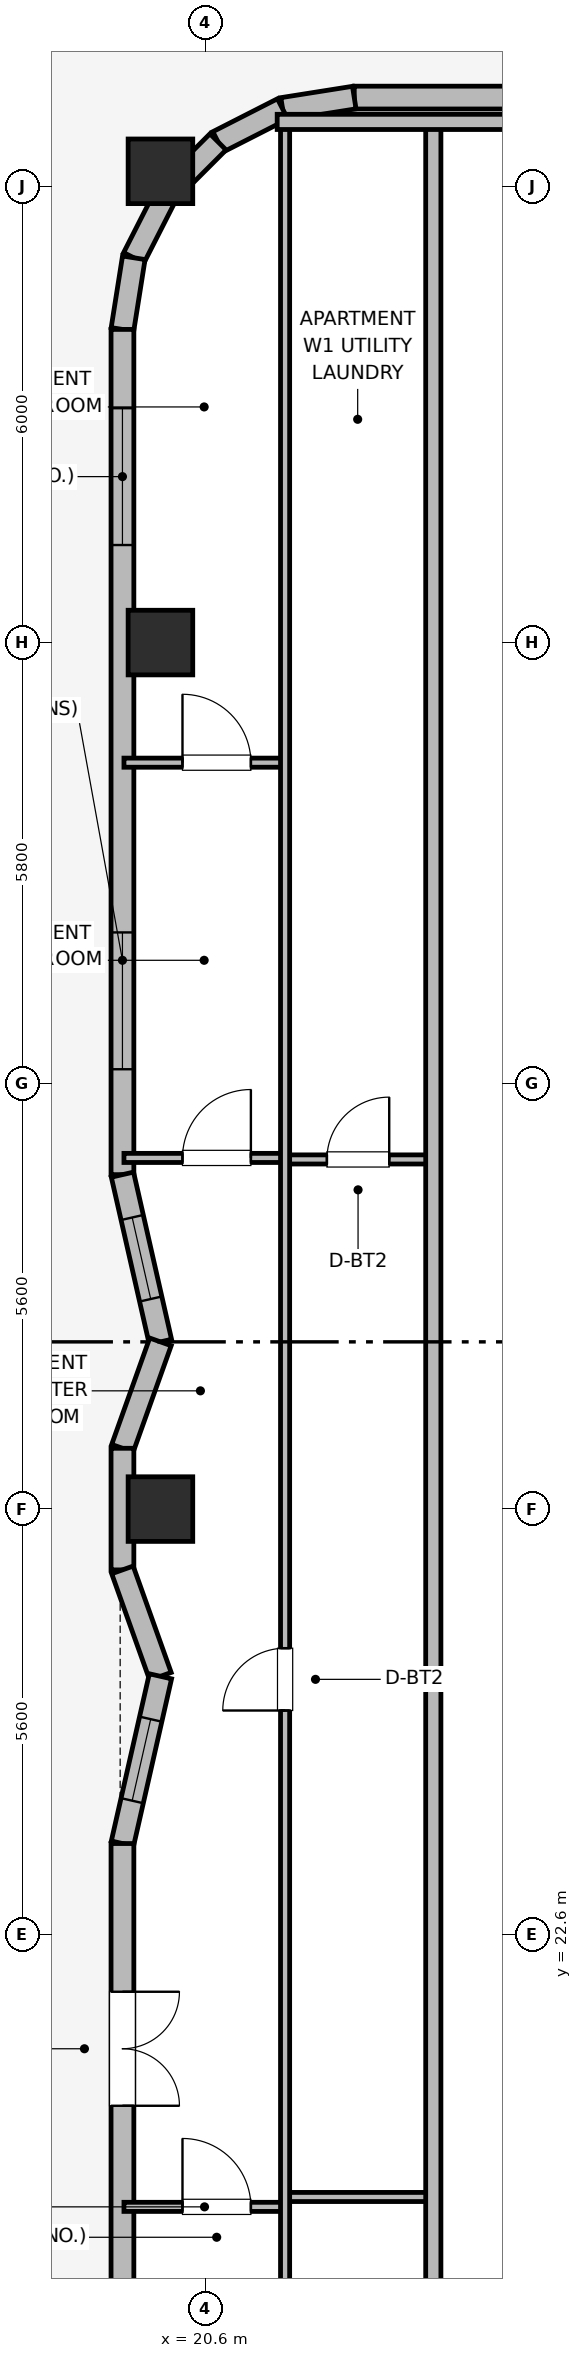
"""IFC4 building model, lengths in metres.
Left out: names, types, materials, properties, quantities, classifications, styles, units other than length and angle.
Written with IfcOpenShell. Run it as: python <this file> out.ifc"""

import sys

from ifc_helpers import new_model, si_unit, direction, frame, frame_2d, origin, origin_2d, place, context, subcontext, project, spatial, rectangle, extrude, element, fill, save


model = new_model("IFC4")
c1 = context("Model", 3, precision=1e-05, world=origin(), true_north=direction((0.0, 1.0)))
c2 = subcontext(c1, "Body", "Model", "MODEL_VIEW")
j1 = project(units=[si_unit("LENGTHUNIT", "METRE"), si_unit("PLANEANGLEUNIT", "RADIAN")], contexts=[c1])
p1 = place(None, origin())
s1 = spatial("IfcSite", under=j1, at=p1, CompositionType="ELEMENT")
p2 = place(p1, origin())
s2 = spatial("IfcBuilding", under=s1, at=p2, CompositionType="ELEMENT")
p3 = place(p2, frame((0.0, 0.0, 225.8)))
s3 = spatial("IfcBuildingStorey", under=s2, at=p3, CompositionType="ELEMENT", Elevation=225.8)
for number, where, z_axis, x_axis in (
    (1, (20.01, 28.2, 0.0), (0.0, 0.0, 1.0), (1.0, 0.0, 0.0)),
    (2, (20.01, 39.6, 0.0), (0.0, 0.0, 1.0), (1.0, 0.0, 0.0)),
    (3, (20.01, 45.8, 0.0), (0.0, 0.0, 1.0), (1.0, 0.0, 0.0)),
):
    element("IfcColumn", number, at=place(p3, frame(where, z_axis=z_axis, x_axis=x_axis)), inside=s3, PredefinedType="COLUMN", context=c2, shape_type="SweptSolid", body=[
        extrude(rectangle(XDim=0.85, YDim=0.85, at=origin_2d()), origin(), (0.0, 0.0, 1.0), 3.7),
    ])
p4 = place(p3, frame((55.84, 46.77, 0.0), z_axis=(0.0, 0.0, 1.0), x_axis=(-1.0, 0.0, 0.0)))
e4 = element("IfcWall", 4, at=p4, inside=s3, PredefinedType="SOLIDWALL", context=c2, shape_type="SweptSolid", body=[
    extrude(rectangle(XDim=33.28, YDim=0.3, at=frame_2d((16.64, 0.0))), origin(), (0.0, 0.0, 1.0), 2.73),
])
p5 = place(p4, frame((4.93, 0.0, 0.71)))
e5 = element("IfcOpeningElement", 5, at=p5, cuts=e4, PredefinedType="OPENING", context=c2, shape_type="SweptSolid", body=[
    extrude(rectangle(XDim=2.1, YDim=1.9, at=frame_2d((1.05, 0.95))), frame((0.0, 0.16, 0.0), z_axis=(0.0, -1.0, 0.0), x_axis=(1.0, 0.0, 0.0)), (0.0, 0.0, 1.0), 0.32),
])
p6 = place(p4, frame((8.483, 0.0, 0.71)))
e6 = element("IfcOpeningElement", 6, at=p6, cuts=e4, PredefinedType="OPENING", context=c2, shape_type="SweptSolid", body=[
    extrude(rectangle(XDim=2.1, YDim=1.9, at=frame_2d((1.05, 0.95))), frame((0.0, 0.16, 0.0), z_axis=(0.0, -1.0, 0.0), x_axis=(1.0, 0.0, 0.0)), (0.0, 0.0, 1.0), 0.32),
])
p7 = place(p4, frame((15.59, 0.0, 0.71)))
e7 = element("IfcOpeningElement", 7, at=p7, cuts=e4, PredefinedType="OPENING", context=c2, shape_type="SweptSolid", body=[
    extrude(rectangle(XDim=2.1, YDim=1.9, at=frame_2d((1.05, 0.95))), frame((0.0, 0.16, 0.0), z_axis=(0.0, -1.0, 0.0), x_axis=(1.0, 0.0, 0.0)), (0.0, 0.0, 1.0), 0.32),
])
p8 = place(p4, frame((22.697, 0.0, 0.71)))
e8 = element("IfcOpeningElement", 8, at=p8, cuts=e4, PredefinedType="OPENING", context=c2, shape_type="SweptSolid", body=[
    extrude(rectangle(XDim=2.1, YDim=1.9, at=frame_2d((1.05, 0.95))), frame((0.0, 0.16, 0.0), z_axis=(0.0, -1.0, 0.0), x_axis=(1.0, 0.0, 0.0)), (0.0, 0.0, 1.0), 0.32),
])
p9 = place(p4, frame((26.25, 0.0, 0.71)))
e9 = element("IfcOpeningElement", 9, at=p9, cuts=e4, PredefinedType="OPENING", context=c2, shape_type="SweptSolid", body=[
    extrude(rectangle(XDim=2.1, YDim=1.9, at=frame_2d((1.05, 0.95))), frame((0.0, 0.16, 0.0), z_axis=(0.0, -1.0, 0.0), x_axis=(1.0, 0.0, 0.0)), (0.0, 0.0, 1.0), 0.32),
])
p10 = place(p3, frame((22.56, 46.77, 0.0), z_axis=(0.0, 0.0, 1.0), x_axis=(-0.987669453596, -0.156553666304, 0.0)))
e10 = element("IfcWall", 10, at=p10, inside=s3, PredefinedType="SOLIDWALL", context=c2, shape_type="SweptSolid", body=[
    extrude(rectangle(XDim=0.954, YDim=0.3, at=frame_2d((0.477, 0.0))), origin(), (0.0, 0.0, 1.0), 2.73),
])
p11 = place(p3, frame((21.617, 46.621, 0.0), z_axis=(0.0, 0.0, 1.0), x_axis=(-0.891023873617, -0.45395644796, 0.0)))
e11 = element("IfcWall", 11, at=p11, inside=s3, PredefinedType="SOLIDWALL", context=c2, shape_type="SweptSolid", body=[
    extrude(rectangle(XDim=0.954, YDim=0.3, at=frame_2d((0.477, 0.0))), origin(), (0.0, 0.0, 1.0), 2.73),
])
p12 = place(p3, frame((20.767, 46.188, 0.0), z_axis=(0.0, 0.0, 1.0), x_axis=(-0.707106781187, -0.707106781187, 0.0)))
e12 = element("IfcWall", 12, at=p12, inside=s3, PredefinedType="SOLIDWALL", context=c2, shape_type="SweptSolid", body=[
    extrude(rectangle(XDim=0.954, YDim=0.3, at=frame_2d((0.477, 0.0))), origin(), (0.0, 0.0, 1.0), 2.73),
])
p13 = place(p3, frame((20.093, 45.513, 0.0), z_axis=(0.0, 0.0, 1.0), x_axis=(-0.454159573051, -0.890920356825, 0.0)))
e13 = element("IfcWall", 13, at=p13, inside=s3, PredefinedType="SOLIDWALL", context=c2, shape_type="SweptSolid", body=[
    extrude(rectangle(XDim=0.954, YDim=0.3, at=frame_2d((0.477, 0.0))), origin(), (0.0, 0.0, 1.0), 2.73),
])
p14 = place(p3, frame((19.659, 44.663, 0.0), z_axis=(0.0, 0.0, 1.0), x_axis=(-0.156304114255, -0.987708977314, 0.0)))
e14 = element("IfcWall", 14, at=p14, inside=s3, PredefinedType="SOLIDWALL", context=c2, shape_type="SweptSolid", body=[
    extrude(rectangle(XDim=0.954, YDim=0.3, at=frame_2d((0.477, 0.0))), origin(), (0.0, 0.0, 1.0), 2.73),
])
p15 = place(p3, frame((19.51, 43.72, 0.0), z_axis=(0.0, 0.0, 1.0), x_axis=(0.0, -1.0, 0.0)))
e15 = element("IfcWall", 15, at=p15, inside=s3, PredefinedType="SOLIDWALL", context=c2, shape_type="SweptSolid", body=[
    extrude(rectangle(XDim=11.12, YDim=0.3, at=frame_2d((5.56, 0.0))), origin(), (0.0, 0.0, 1.0), 2.73),
])
p16 = place(p15, frame((1.037, 0.0, 0.76)))
e16 = element("IfcOpeningElement", 16, at=p16, cuts=e15, PredefinedType="OPENING", context=c2, shape_type="SweptSolid", body=[
    extrude(rectangle(XDim=1.8, YDim=1.85, at=frame_2d((0.9, 0.925))), frame((0.0, 0.16, 0.0), z_axis=(0.0, -1.0, 0.0), x_axis=(1.0, 0.0, 0.0)), (0.0, 0.0, 1.0), 0.32),
])
p17 = place(p15, frame((7.933, 0.0, 0.76)))
e17 = element("IfcOpeningElement", 17, at=p17, cuts=e15, PredefinedType="OPENING", context=c2, shape_type="SweptSolid", body=[
    extrude(rectangle(XDim=1.8, YDim=1.85, at=frame_2d((0.9, 0.925))), frame((0.0, 0.16, 0.0), z_axis=(0.0, -1.0, 0.0), x_axis=(1.0, 0.0, 0.0)), (0.0, 0.0, 1.0), 0.32),
])
p18 = place(p3, frame((19.51, 32.6, 0.0), z_axis=(0.0, 0.0, 1.0), x_axis=(0.221602396322, -0.975137107254, 0.0)))
e18 = element("IfcWall", 18, at=p18, inside=s3, PredefinedType="SOLIDWALL", context=c2, shape_type="SweptSolid", body=[
    extrude(rectangle(XDim=2.256, YDim=0.3, at=frame_2d((1.128, 0.0))), origin(), (0.0, 0.0, 1.0), 2.73),
])
p19 = place(p18, frame((0.578, 0.0, 0.92)))
e19 = element("IfcOpeningElement", 19, at=p19, cuts=e18, PredefinedType="OPENING", context=c2, shape_type="SweptSolid", body=[
    extrude(rectangle(XDim=1.1, YDim=1.65, at=frame_2d((0.55, 0.825))), frame((0.0, 0.16, 0.0), z_axis=(0.0, -1.0, 0.0), x_axis=(1.0, 0.0, 0.0)), (0.0, 0.0, 1.0), 0.32),
])
p20 = place(p3, frame((20.01, 30.4, 0.0), z_axis=(0.0, 0.0, 1.0), x_axis=(-0.336357205213, -0.94173447983, 0.0)))
e20 = element("IfcWall", 20, at=p20, inside=s3, PredefinedType="SOLIDWALL", context=c2, shape_type="SweptSolid", body=[
    extrude(rectangle(XDim=1.487, YDim=0.3, at=frame_2d((0.743, 0.0))), origin(), (0.0, 0.0, 1.0), 2.73),
])
p21 = place(p3, frame((19.51, 29.0, 0.0), z_axis=(0.0, 0.0, 1.0), x_axis=(0.0, -1.0, 0.0)))
e21 = element("IfcWall", 21, at=p21, inside=s3, PredefinedType="SOLIDWALL", context=c2, shape_type="SweptSolid", body=[
    extrude(rectangle(XDim=1.6, YDim=0.3, at=frame_2d((0.8, 0.0))), origin(), (0.0, 0.0, 1.0), 2.73),
])
p22 = place(p3, frame((19.51, 27.4, 0.0), z_axis=(0.0, 0.0, 1.0), x_axis=(0.336357205213, -0.94173447983, 0.0)))
e22 = element("IfcWall", 22, at=p22, inside=s3, PredefinedType="SOLIDWALL", context=c2, shape_type="SweptSolid", body=[
    extrude(rectangle(XDim=1.487, YDim=0.3, at=frame_2d((0.743, 0.0))), origin(), (0.0, 0.0, 1.0), 2.73),
])
p23 = place(p3, frame((20.01, 26.0, 0.0), z_axis=(0.0, 0.0, 1.0), x_axis=(-0.221625780886, -0.975131792758, 0.0)))
e23 = element("IfcWall", 23, at=p23, inside=s3, PredefinedType="SOLIDWALL", context=c2, shape_type="SweptSolid", body=[
    extrude(rectangle(XDim=2.256, YDim=0.3, at=frame_2d((1.128, 0.0))), origin(), (0.0, 0.0, 1.0), 2.73),
])
p24 = place(p23, frame((0.578, 0.0, 0.92)))
e24 = element("IfcOpeningElement", 24, at=p24, cuts=e23, PredefinedType="OPENING", context=c2, shape_type="SweptSolid", body=[
    extrude(rectangle(XDim=1.1, YDim=1.65, at=frame_2d((0.55, 0.825))), frame((0.0, 0.16, 0.0), z_axis=(0.0, -1.0, 0.0), x_axis=(1.0, 0.0, 0.0)), (0.0, 0.0, 1.0), 0.32),
])
p25 = place(p3, frame((19.51, 23.8, 0.0), z_axis=(0.0, 0.0, 1.0), x_axis=(0.0, -1.0, 0.0)))
e25 = element("IfcWall", 25, at=p25, inside=s3, PredefinedType="SOLIDWALL", context=c2, shape_type="SweptSolid", body=[
    extrude(rectangle(XDim=11.12, YDim=0.3, at=frame_2d((5.56, 0.0))), origin(), (0.0, 0.0, 1.0), 2.73),
])
p26 = place(p25, frame((1.95, 0.0, 0.0)))
e26 = element("IfcOpeningElement", 26, at=p26, cuts=e25, PredefinedType="OPENING", context=c2, shape_type="SweptSolid", body=[
    extrude(rectangle(XDim=1.5, YDim=2.1, at=frame_2d((0.75, 1.05))), frame((0.0, 0.16, 0.0), z_axis=(0.0, -1.0, 0.0), x_axis=(1.0, 0.0, 0.0)), (0.0, 0.0, 1.0), 0.32),
])
p27 = place(p25, frame((8.383, 0.0, 0.71)))
e27 = element("IfcOpeningElement", 27, at=p27, cuts=e25, PredefinedType="OPENING", context=c2, shape_type="SweptSolid", body=[
    extrude(rectangle(XDim=1.6, YDim=1.9, at=frame_2d((0.8, 0.95))), frame((0.0, 0.16, 0.0), z_axis=(0.0, -1.0, 0.0), x_axis=(1.0, 0.0, 0.0)), (0.0, 0.0, 1.0), 0.32),
])
p28 = place(p3, frame((21.65, 19.15, 0.0), z_axis=(0.0, 0.0, 1.0), x_axis=(1.0, 0.0, 0.0)))
e28 = element("IfcWall", 28, at=p28, inside=s3, PredefinedType="PARTITIONING", context=c2, shape_type="SweptSolid", body=[
    extrude(rectangle(XDim=1.95, YDim=0.12, at=frame_2d((0.975, 0.0))), origin(), (0.0, 0.0, 1.0), 2.56),
])
p29 = place(p3, frame((21.65, 32.8, 0.0), z_axis=(0.0, 0.0, 1.0), x_axis=(1.0, 0.0, 0.0)))
e29 = element("IfcWall", 29, at=p29, inside=s3, PredefinedType="PARTITIONING", context=c2, shape_type="SweptSolid", body=[
    extrude(rectangle(XDim=1.95, YDim=0.12, at=frame_2d((0.975, 0.0))), origin(), (0.0, 0.0, 1.0), 2.56),
])
p30 = place(p29, frame((0.55, 0.0, 0.0)))
e30 = element("IfcOpeningElement", 30, at=p30, cuts=e29, PredefinedType="OPENING", context=c2, shape_type="SweptSolid", body=[
    extrude(rectangle(XDim=0.82, YDim=2.08, at=frame_2d((0.41, 1.04))), frame((0.0, 0.07, 0.0), z_axis=(0.0, -1.0, 0.0), x_axis=(1.0, 0.0, 0.0)), (0.0, 0.0, 1.0), 0.14),
])
p31 = place(p3, frame((19.53, 19.02, 0.0), z_axis=(0.0, 0.0, 1.0), x_axis=(1.0, 0.0, 0.0)))
e31 = element("IfcWall", 31, at=p31, inside=s3, PredefinedType="PARTITIONING", context=c2, shape_type="SweptSolid", body=[
    extrude(rectangle(XDim=2.12, YDim=0.12, at=frame_2d((1.06, 0.0))), origin(), (0.0, 0.0, 1.0), 2.56),
])
p32 = place(p31, frame((0.77, 0.0, 0.0)))
e32 = element("IfcOpeningElement", 32, at=p32, cuts=e31, PredefinedType="OPENING", context=c2, shape_type="SweptSolid", body=[
    extrude(rectangle(XDim=0.9, YDim=2.1, at=frame_2d((0.45, 1.05))), frame((0.0, 0.07, 0.0), z_axis=(0.0, -1.0, 0.0), x_axis=(1.0, 0.0, 0.0)), (0.0, 0.0, 1.0), 0.14),
])
p33 = place(p3, frame((19.53, 32.82, 0.0), z_axis=(0.0, 0.0, 1.0), x_axis=(1.0, 0.0, 0.0)))
e33 = element("IfcWall", 33, at=p33, inside=s3, PredefinedType="PARTITIONING", context=c2, shape_type="SweptSolid", body=[
    extrude(rectangle(XDim=2.12, YDim=0.12, at=frame_2d((1.06, 0.0))), origin(), (0.0, 0.0, 1.0), 2.56),
])
p34 = place(p33, frame((0.77, 0.0, 0.0)))
e34 = element("IfcOpeningElement", 34, at=p34, cuts=e33, PredefinedType="OPENING", context=c2, shape_type="SweptSolid", body=[
    extrude(rectangle(XDim=0.9, YDim=2.1, at=frame_2d((0.45, 1.05))), frame((0.0, 0.07, 0.0), z_axis=(0.0, -1.0, 0.0), x_axis=(1.0, 0.0, 0.0)), (0.0, 0.0, 1.0), 0.14),
])
p35 = place(p3, frame((19.53, 38.02, 0.0), z_axis=(0.0, 0.0, 1.0), x_axis=(1.0, 0.0, 0.0)))
e35 = element("IfcWall", 35, at=p35, inside=s3, PredefinedType="PARTITIONING", context=c2, shape_type="SweptSolid", body=[
    extrude(rectangle(XDim=2.12, YDim=0.12, at=frame_2d((1.06, 0.0))), origin(), (0.0, 0.0, 1.0), 2.56),
])
p36 = place(p35, frame((0.77, 0.0, 0.0)))
e36 = element("IfcOpeningElement", 36, at=p36, cuts=e35, PredefinedType="OPENING", context=c2, shape_type="SweptSolid", body=[
    extrude(rectangle(XDim=0.9, YDim=2.1, at=frame_2d((0.45, 1.05))), frame((0.0, 0.07, 0.0), z_axis=(0.0, -1.0, 0.0), x_axis=(1.0, 0.0, 0.0)), (0.0, 0.0, 1.0), 0.14),
])
p37 = place(p3, frame((21.65, 9.99, 0.0), z_axis=(0.0, 0.0, 1.0), x_axis=(0.0, 1.0, 0.0)))
e37 = element("IfcWall", 37, at=p37, inside=s3, PredefinedType="PARTITIONING", context=c2, shape_type="SweptSolid", body=[
    extrude(rectangle(XDim=36.42, YDim=0.12, at=frame_2d((18.21, 0.0))), origin(), (0.0, 0.0, 1.0), 2.56),
])
p38 = place(p37, frame((0.41, 0.0, 0.0)))
e38 = element("IfcOpeningElement", 38, at=p38, cuts=e37, PredefinedType="OPENING", context=c2, shape_type="SweptSolid", body=[
    extrude(rectangle(XDim=0.9, YDim=2.1, at=frame_2d((0.45, 1.05))), frame((0.0, 0.07, 0.0), z_axis=(0.0, -1.0, 0.0), x_axis=(1.0, 0.0, 0.0)), (0.0, 0.0, 1.0), 0.14),
])
p39 = place(p37, frame((15.56, 0.0, 0.0)))
e39 = element("IfcOpeningElement", 39, at=p39, cuts=e37, PredefinedType="OPENING", context=c2, shape_type="SweptSolid", body=[
    extrude(rectangle(XDim=0.82, YDim=2.08, at=frame_2d((0.41, 1.04))), frame((0.0, 0.07, 0.0), z_axis=(0.0, -1.0, 0.0), x_axis=(1.0, 0.0, 0.0)), (0.0, 0.0, 1.0), 0.14),
])
p40 = place(p3, frame((23.6, 9.95, 0.0), z_axis=(0.0, 0.0, 1.0), x_axis=(0.0, 1.0, 0.0)))
e40 = element("IfcWall", 40, at=p40, inside=s3, PredefinedType="PARTITIONING", context=c2, shape_type="SweptSolid", body=[
    extrude(rectangle(XDim=36.5, YDim=0.2, at=frame_2d((18.25, 0.0))), origin(), (0.0, 0.0, 1.0), 2.56),
])
p41 = place(p40, frame((3.25, 0.0, 0.0)))
e41 = element("IfcOpeningElement", 41, at=p41, cuts=e40, PredefinedType="OPENING", context=c2, shape_type="SweptSolid", body=[
    extrude(rectangle(XDim=1.0, YDim=2.15, at=frame_2d((0.5, 1.075))), frame((0.0, 0.11, 0.0), z_axis=(0.0, -1.0, 0.0), x_axis=(1.0, 0.0, 0.0)), (0.0, 0.0, 1.0), 0.22),
])
p42 = place(p3, frame((21.546, 46.45, 0.0), z_axis=(0.0, 0.0, 1.0), x_axis=(1.0, 0.0, 0.0)))
e42 = element("IfcWall", 42, at=p42, inside=s3, PredefinedType="PARTITIONING", context=c2, shape_type="SweptSolid", body=[
    extrude(rectangle(XDim=3.754, YDim=0.2, at=frame_2d((1.877, 0.0))), origin(), (0.0, 0.0, 1.0), 2.56),
])
p43 = place(p16, origin())
e43 = element("IfcWindow", 43, at=p43, inside=s3, PartitioningType="SINGLE_PANEL", PredefinedType="WINDOW", context=c2, shape_type="SweptSolid", body=[
    extrude(rectangle(XDim=1.8, YDim=1.85, at=frame_2d((0.9, 0.925))), frame((0.0, 0.03, 0.0), z_axis=(0.0, -1.0, 0.0), x_axis=(1.0, 0.0, 0.0)), (0.0, 0.0, 1.0), 0.06),
])
fill(e16, e43)
p44 = place(p17, origin())
e44 = element("IfcWindow", 44, at=p44, inside=s3, PartitioningType="SINGLE_PANEL", PredefinedType="WINDOW", context=c2, shape_type="SweptSolid", body=[
    extrude(rectangle(XDim=1.8, YDim=1.85, at=frame_2d((0.9, 0.925))), frame((0.0, 0.03, 0.0), z_axis=(0.0, -1.0, 0.0), x_axis=(1.0, 0.0, 0.0)), (0.0, 0.0, 1.0), 0.06),
])
fill(e17, e44)
p45 = place(p19, origin())
e45 = element("IfcWindow", 45, at=p45, inside=s3, PartitioningType="SINGLE_PANEL", PredefinedType="WINDOW", context=c2, shape_type="SweptSolid", body=[
    extrude(rectangle(XDim=1.1, YDim=1.65, at=frame_2d((0.55, 0.825))), frame((0.0, 0.03, 0.0), z_axis=(0.0, -1.0, 0.0), x_axis=(1.0, 0.0, 0.0)), (0.0, 0.0, 1.0), 0.06),
])
fill(e19, e45)
p46 = place(p24, origin())
e46 = element("IfcWindow", 46, at=p46, inside=s3, PartitioningType="SINGLE_PANEL", PredefinedType="WINDOW", context=c2, shape_type="SweptSolid", body=[
    extrude(rectangle(XDim=1.1, YDim=1.65, at=frame_2d((0.55, 0.825))), frame((0.0, 0.03, 0.0), z_axis=(0.0, -1.0, 0.0), x_axis=(1.0, 0.0, 0.0)), (0.0, 0.0, 1.0), 0.06),
])
fill(e24, e46)
p47 = place(p26, origin())
e47 = element("IfcDoor", 47, at=p47, inside=s3, OperationType="DOUBLE_DOOR_SINGLE_SWING", PredefinedType="DOOR", context=c2, shape_type="SweptSolid", body=[
    extrude(rectangle(XDim=1.5, YDim=2.1, at=frame_2d((0.75, 1.05))), frame((0.0, 0.025, 0.0), z_axis=(0.0, -1.0, 0.0), x_axis=(1.0, 0.0, 0.0)), (0.0, 0.0, 1.0), 0.05),
])
fill(e26, e47)
p48 = place(p30, origin())
e48 = element("IfcDoor", 48, at=p48, inside=s3, OperationType="SINGLE_SWING_RIGHT", PredefinedType="DOOR", context=c2, shape_type="SweptSolid", body=[
    extrude(rectangle(XDim=0.82, YDim=2.08, at=frame_2d((0.41, 1.04))), frame((0.0, 0.025, 0.0), z_axis=(0.0, -1.0, 0.0), x_axis=(1.0, 0.0, 0.0)), (0.0, 0.0, 1.0), 0.05),
])
fill(e30, e48)
p49 = place(p32, origin())
e49 = element("IfcDoor", 49, at=p49, inside=s3, OperationType="SINGLE_SWING_LEFT", PredefinedType="DOOR", context=c2, shape_type="SweptSolid", body=[
    extrude(rectangle(XDim=0.9, YDim=2.1, at=frame_2d((0.45, 1.05))), frame((0.0, 0.025, 0.0), z_axis=(0.0, -1.0, 0.0), x_axis=(1.0, 0.0, 0.0)), (0.0, 0.0, 1.0), 0.05),
])
fill(e32, e49)
p50 = place(p34, origin())
e50 = element("IfcDoor", 50, at=p50, inside=s3, OperationType="SINGLE_SWING_RIGHT", PredefinedType="DOOR", context=c2, shape_type="SweptSolid", body=[
    extrude(rectangle(XDim=0.9, YDim=2.1, at=frame_2d((0.45, 1.05))), frame((0.0, 0.025, 0.0), z_axis=(0.0, -1.0, 0.0), x_axis=(1.0, 0.0, 0.0)), (0.0, 0.0, 1.0), 0.05),
])
fill(e34, e50)
p51 = place(p36, origin())
e51 = element("IfcDoor", 51, at=p51, inside=s3, OperationType="SINGLE_SWING_LEFT", PredefinedType="DOOR", context=c2, shape_type="SweptSolid", body=[
    extrude(rectangle(XDim=0.9, YDim=2.1, at=frame_2d((0.45, 1.05))), frame((0.0, 0.025, 0.0), z_axis=(0.0, -1.0, 0.0), x_axis=(1.0, 0.0, 0.0)), (0.0, 0.0, 1.0), 0.05),
])
fill(e36, e51)
p52 = place(p39, origin())
e52 = element("IfcDoor", 52, at=p52, inside=s3, OperationType="SINGLE_SWING_LEFT", PredefinedType="DOOR", context=c2, shape_type="SweptSolid", body=[
    extrude(rectangle(XDim=0.82, YDim=2.08, at=frame_2d((0.41, 1.04))), frame((0.0, 0.025, 0.0), z_axis=(0.0, -1.0, 0.0), x_axis=(1.0, 0.0, 0.0)), (0.0, 0.0, 1.0), 0.05),
])
fill(e39, e52)
save(model, sys.argv[1])
